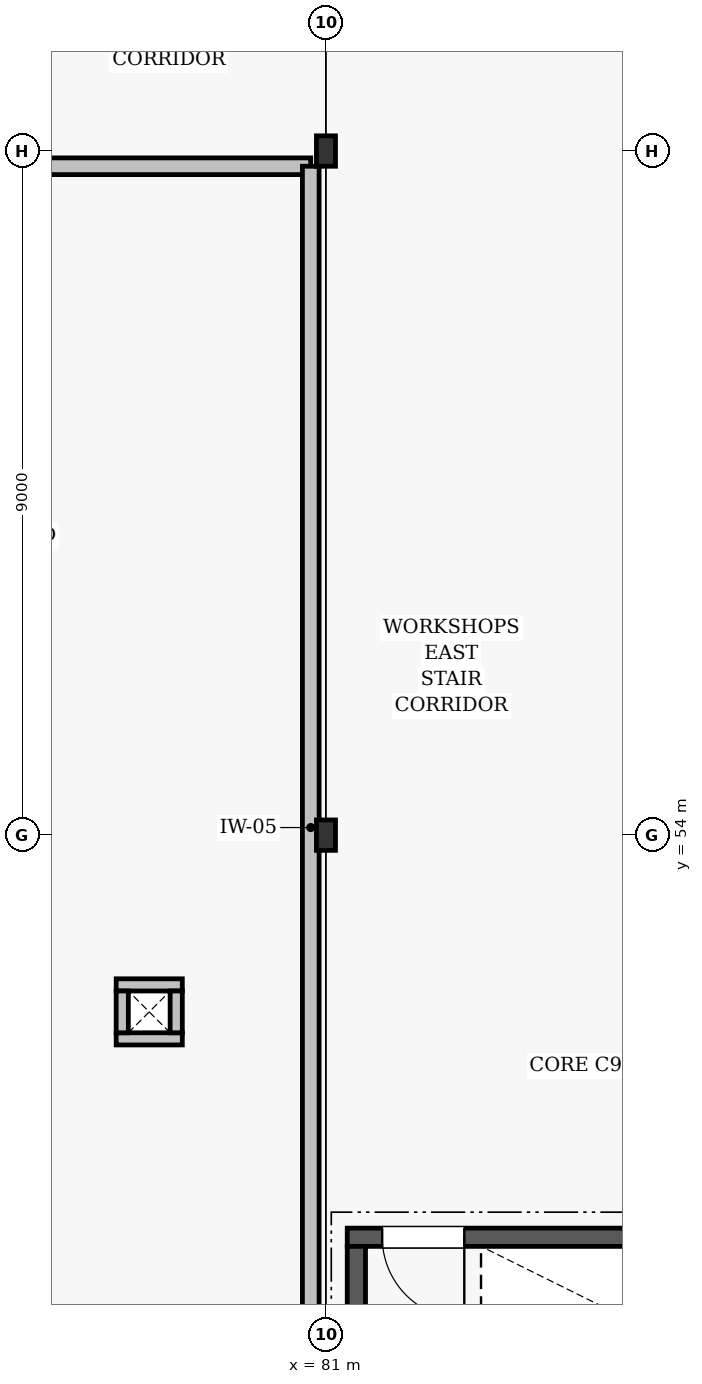
"""IFC4 building model, lengths in metres.
Left out: names, types, materials, properties, quantities, classifications, styles, units other than length and angle.
Written with IfcOpenShell. Run it as: python <this file> out.ifc"""

import sys

from ifc_helpers import new_model, si_unit, direction, frame, frame_2d, origin, origin_2d, place, context, subcontext, project, spatial, rectangle, i_section, extrude, element, fill, save


model = new_model("IFC4")
c1 = context("Model", 3, precision=1e-05, world=origin(), true_north=direction((0.0, 1.0)))
c2 = subcontext(c1, "Body", "Model", "MODEL_VIEW")
j1 = project(units=[si_unit("LENGTHUNIT", "METRE"), si_unit("PLANEANGLEUNIT", "RADIAN")], contexts=[c1])
p1 = place(None, origin())
s1 = spatial("IfcSite", under=j1, at=p1, CompositionType="ELEMENT")
p2 = place(p1, origin())
s2 = spatial("IfcBuilding", under=s1, at=p2, CompositionType="ELEMENT")
p3 = place(p2, frame((0.0, 0.0, 4.8)))
s3 = spatial("IfcBuildingStorey", under=s2, at=p3, CompositionType="ELEMENT", Elevation=4.8)
for number, where, z_axis, x_axis in (
    (1, (81.0, 54.0, 0.0), (0.0, 0.0, 1.0), (1.0, 0.0, 0.0)),
    (2, (81.0, 63.0, 0.0), (0.0, 0.0, 1.0), (1.0, 0.0, 0.0)),
):
    element("IfcColumn", number, at=place(p3, frame(where, z_axis=z_axis, x_axis=x_axis)), inside=s3, PredefinedType="COLUMN", context=c2, shape_type="SweptSolid", body=[
        extrude(i_section(OverallWidth=0.25, OverallDepth=0.4, WebThickness=0.01, FlangeThickness=0.013, FilletRadius=0.014, at=origin_2d()), origin(), (0.0, 0.0, 1.0), 3.6),
    ])
p4 = place(p3, frame((81.28, 48.71, 0.0), z_axis=(0.0, 0.0, 1.0), x_axis=(1.0, 0.0, 0.0)))
e3 = element("IfcWall", 3, at=p4, inside=s3, PredefinedType="SHEAR", context=c2, shape_type="SweptSolid", body=[
    extrude(rectangle(XDim=8.44, YDim=0.24, at=frame_2d((4.22, 0.0))), origin(), (0.0, 0.0, 1.0), 3.35),
])
p5 = place(p4, frame((0.46, 0.0, 0.0)))
e4 = element("IfcOpeningElement", 4, at=p5, cuts=e3, PredefinedType="OPENING", context=c2, shape_type="SweptSolid", body=[
    extrude(rectangle(XDim=1.08, YDim=2.08, at=frame_2d((0.54, 1.04))), frame((0.0, 0.13, 0.0), z_axis=(0.0, -1.0, 0.0), x_axis=(1.0, 0.0, 0.0)), (0.0, 0.0, 1.0), 0.26),
])
p6 = place(p3, frame((81.4, 45.4, 0.0), z_axis=(0.0, 0.0, 1.0), x_axis=(0.0, 1.0, 0.0)))
e5 = element("IfcWall", 5, at=p6, inside=s3, PredefinedType="SHEAR", context=c2, shape_type="SweptSolid", body=[
    extrude(rectangle(XDim=3.19, YDim=0.24, at=frame_2d((1.595, 0.0))), origin(), (0.0, 0.0, 1.0), 3.35),
])
for number, where, z_axis, x_axis in (
    (6, (78.24, 51.32, 0.0), (0.0, 0.0, 1.0), (1.0, 0.0, 0.0)),
    (7, (78.24, 52.03, 0.0), (0.0, 0.0, 1.0), (1.0, 0.0, 0.0)),
):
    element("IfcWall", number, at=place(p3, frame(where, z_axis=z_axis, x_axis=x_axis)), inside=s3, PredefinedType="PARTITIONING", context=c2, shape_type="SweptSolid", body=[
        extrude(rectangle(XDim=0.87, YDim=0.16, at=frame_2d((0.435, 0.0))), origin(), (0.0, 0.0, 1.0), 3.35),
    ])
for number, where, z_axis, x_axis in (
    (8, (78.32, 51.4, 0.0), (0.0, 0.0, 1.0), (0.0, 1.0, 0.0)),
    (9, (79.03, 51.4, 0.0), (0.0, 0.0, 1.0), (0.0, 1.0, 0.0)),
):
    element("IfcWall", number, at=place(p3, frame(where, z_axis=z_axis, x_axis=x_axis)), inside=s3, PredefinedType="PARTITIONING", context=c2, shape_type="SweptSolid", body=[
        extrude(rectangle(XDim=0.55, YDim=0.16, at=frame_2d((0.275, 0.0))), origin(), (0.0, 0.0, 1.0), 3.35),
    ])
p7 = place(p3, frame((45.4, 62.8, 0.0), z_axis=(0.0, 0.0, 1.0), x_axis=(1.0, 0.0, 0.0)))
e10 = element("IfcWall", 10, at=p7, inside=s3, PredefinedType="SOLIDWALL", context=c2, shape_type="SweptSolid", body=[
    extrude(rectangle(XDim=35.4, YDim=0.22, at=frame_2d((17.7, 0.0))), origin(), (0.0, 0.0, 1.0), 2.745),
])
p8 = place(p7, frame((21.34, 0.0, 0.0)))
e11 = element("IfcOpeningElement", 11, at=p8, cuts=e10, PredefinedType="OPENING", context=c2, shape_type="SweptSolid", body=[
    extrude(rectangle(XDim=1.52, YDim=2.16, at=frame_2d((0.76, 1.08))), frame((0.0, 0.12, 0.0), z_axis=(0.0, -1.0, 0.0), x_axis=(1.0, 0.0, 0.0)), (0.0, 0.0, 1.0), 0.24),
])
p9 = place(p3, frame((80.8, 45.4, 0.0), z_axis=(0.0, 0.0, 1.0), x_axis=(0.0, 1.0, 0.0)))
e12 = element("IfcWall", 12, at=p9, inside=s3, PredefinedType="SOLIDWALL", context=c2, shape_type="SweptSolid", body=[
    extrude(rectangle(XDim=17.4, YDim=0.22, at=frame_2d((8.7, 0.0))), origin(), (0.0, 0.0, 1.0), 2.745),
])
p10 = place(p5, frame((1.08, 0.0, 0.0), z_axis=(0.0, 0.0, 1.0), x_axis=(-1.0, 0.0, 0.0)))
e13 = element("IfcDoor", 13, at=p10, inside=s3, OperationType="SINGLE_SWING_RIGHT", PredefinedType="DOOR", context=c2, shape_type="SweptSolid", body=[
    extrude(rectangle(XDim=1.08, YDim=2.08, at=frame_2d((0.54, 1.04))), frame((0.0, 0.025, 0.0), z_axis=(0.0, -1.0, 0.0), x_axis=(1.0, 0.0, 0.0)), (0.0, 0.0, 1.0), 0.05),
])
fill(e4, e13)
save(model, sys.argv[1])
